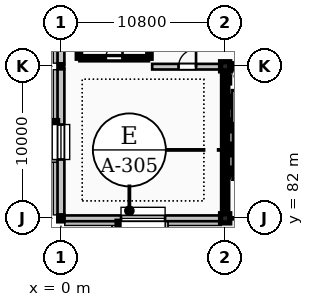
"""IFC4 building model, lengths in metres.
Left out: names, types, materials, properties, quantities, classifications, styles, units other than length and angle.
Written with IfcOpenShell. Run it as: python <this file> out.ifc"""

import sys

from ifc_helpers import new_model, si_unit, direction, frame, frame_2d, origin, origin_2d, place, context, subcontext, project, spatial, rectangle, hollow_rectangle, i_section, extrude, element, fill, save


model = new_model("IFC4")
c1 = context("Model", 3, precision=1e-05, world=origin(), true_north=direction((0.0, 1.0)))
c2 = subcontext(c1, "Body", "Model", "MODEL_VIEW")
j1 = project(units=[si_unit("LENGTHUNIT", "METRE"), si_unit("PLANEANGLEUNIT", "RADIAN")], contexts=[c1])
p1 = place(None, origin())
s1 = spatial("IfcSite", under=j1, at=p1, CompositionType="ELEMENT")
p2 = place(p1, origin())
s2 = spatial("IfcBuilding", under=s1, at=p2, CompositionType="ELEMENT")
p3 = place(p2, frame((0.0, 0.0, 24.0)))
s3 = spatial("IfcBuildingStorey", under=s2, at=p3, CompositionType="ELEMENT", Elevation=24.0)
p4 = place(p3, frame((0.0, 82.0, 0.0), z_axis=(0.0, 0.0, 1.0), x_axis=(1.0, 0.0, 0.0)))
e1 = element("IfcColumn", 1, at=p4, inside=s3, PredefinedType="COLUMN", context=c2, shape_type="SweptSolid", body=[
    extrude(i_section(OverallWidth=0.3, OverallDepth=0.34, WebThickness=0.012, FlangeThickness=0.021, FilletRadius=0.027, at=origin_2d()), origin(), (0.0, 0.0, 1.0), 4.8),
])
p5 = place(p3, frame((0.0, 92.0, 0.0), z_axis=(0.0, 0.0, 1.0), x_axis=(1.0, 0.0, 0.0)))
e2 = element("IfcColumn", 2, at=p5, inside=s3, PredefinedType="COLUMN", context=c2, shape_type="SweptSolid", body=[
    extrude(hollow_rectangle(XDim=0.22, YDim=0.22, WallThickness=0.012, InnerFilletRadius=0.012, OuterFilletRadius=0.025, at=origin_2d()), origin(), (0.0, 0.0, 1.0), 4.8),
])
for number, where, z_axis, x_axis in (
    (3, (10.8, 82.0, 0.0), (0.0, 0.0, 1.0), (1.0, 0.0, 0.0)),
    (4, (10.8, 92.0, 0.0), (0.0, 0.0, 1.0), (1.0, 0.0, 0.0)),
):
    element("IfcColumn", number, at=place(p3, frame(where, z_axis=z_axis, x_axis=x_axis)), inside=s3, PredefinedType="COLUMN", context=c2, shape_type="SweptSolid", body=[
        extrude(rectangle(XDim=0.6, YDim=0.6, at=origin_2d()), origin(), (0.0, 0.0, 1.0), 4.8),
    ])
p6 = place(p3, frame((0.0, 101.894, 0.0), z_axis=(0.0, 0.0, 1.0), x_axis=(0.0, -1.0, 0.0)))
e5 = element("IfcWall", 5, at=p6, inside=s3, PredefinedType="STANDARD", context=c2, shape_type="SweptSolid", body=[
    extrude(rectangle(XDim=9.788, YDim=0.45, at=frame_2d((4.894, 0.0))), origin(), (0.0, 0.0, 1.0), 4.56),
])
p7 = place(p6, frame((3.144, 0.0, 1.0)))
e6 = element("IfcOpeningElement", 6, at=p7, cuts=e5, PredefinedType="OPENING", context=c2, shape_type="SweptSolid", body=[
    extrude(rectangle(XDim=3.5, YDim=2.3, at=frame_2d((1.75, 1.15))), frame((0.0, 0.235, 0.0), z_axis=(0.0, -1.0, 0.0), x_axis=(1.0, 0.0, 0.0)), (0.0, 0.0, 1.0), 0.47),
])
p8 = place(p3, frame((0.0, 91.894, 0.0), z_axis=(0.0, 0.0, 1.0), x_axis=(0.0, -1.0, 0.0)))
e7 = element("IfcWall", 7, at=p8, inside=s3, PredefinedType="STANDARD", context=c2, shape_type="SweptSolid", body=[
    extrude(rectangle(XDim=9.749, YDim=0.45, at=frame_2d((4.875, 0.0))), origin(), (0.0, 0.0, 1.0), 4.56),
])
p9 = place(p8, frame((3.725, 0.0, 1.0)))
e8 = element("IfcOpeningElement", 8, at=p9, cuts=e7, PredefinedType="OPENING", context=c2, shape_type="SweptSolid", body=[
    extrude(rectangle(XDim=2.3, YDim=2.3, at=frame_2d((1.15, 1.15))), frame((0.0, 0.235, 0.0), z_axis=(0.0, -1.0, 0.0), x_axis=(1.0, 0.0, 0.0)), (0.0, 0.0, 1.0), 0.47),
])
p10 = place(p3, frame((0.145, 82.0, 0.0), z_axis=(0.0, 0.0, 1.0), x_axis=(1.0, 0.0, 0.0)))
e9 = element("IfcWall", 9, at=p10, inside=s3, PredefinedType="STANDARD", context=c2, shape_type="SweptSolid", body=[
    extrude(rectangle(XDim=10.51, YDim=0.38, at=frame_2d((5.255, 0.0))), origin(), (0.0, 0.0, 1.0), 4.17),
])
p11 = place(p10, frame((3.805, 0.0, 1.0)))
e10 = element("IfcOpeningElement", 10, at=p11, cuts=e9, PredefinedType="OPENING", context=c2, shape_type="SweptSolid", body=[
    extrude(rectangle(XDim=2.9, YDim=2.5, at=frame_2d((1.45, 1.25))), frame((0.0, 0.2, 0.0), z_axis=(0.0, -1.0, 0.0), x_axis=(1.0, 0.0, 0.0)), (0.0, 0.0, 1.0), 0.4),
])
p12 = place(p3, frame((10.945, 82.0, 0.0), z_axis=(0.0, 0.0, 1.0), x_axis=(1.0, 0.0, 0.0)))
e11 = element("IfcWall", 11, at=p12, inside=s3, PredefinedType="STANDARD", context=c2, shape_type="SweptSolid", body=[
    extrude(rectangle(XDim=0.225, YDim=0.3, at=frame_2d((0.112, 0.0))), origin(), (0.0, 0.0, 1.0), 4.56),
])
p13 = place(p3, frame((11.1, 92.0, 0.0), z_axis=(0.0, 0.0, 1.0), x_axis=(1.0, 0.0, 0.0)))
e12 = element("IfcWall", 12, at=p13, inside=s3, PredefinedType="SHEAR", context=c2, shape_type="SweptSolid", body=[
    extrude(rectangle(XDim=10.2, YDim=0.35, at=frame_2d((5.1, 0.0))), origin(), (0.0, 0.0, 1.0), 4.56),
])
p14 = place(p3, frame((10.8, 82.3, 0.0), z_axis=(0.0, 0.0, 1.0), x_axis=(0.0, 1.0, 0.0)))
e13 = element("IfcWall", 13, at=p14, inside=s3, PredefinedType="SHEAR", context=c2, shape_type="SweptSolid", body=[
    extrude(rectangle(XDim=9.4, YDim=0.35, at=frame_2d((4.7, 0.0))), origin(), (0.0, 0.0, 1.0), 4.56),
])
for number, where, z_axis, x_axis in (
    (14, (1.18, 92.53, 0.0), (0.0, 0.0, 1.0), (0.0, 1.0, 0.0)),
    (15, (5.82, 92.53, 0.0), (0.0, 0.0, 1.0), (0.0, 1.0, 0.0)),
):
    element("IfcWall", number, at=place(p3, frame(where, z_axis=z_axis, x_axis=x_axis)), inside=s3, PredefinedType="SHEAR", context=c2, shape_type="SweptSolid", body=[
        extrude(rectangle(XDim=9.14, YDim=0.22, at=frame_2d((4.57, 0.0))), origin(), (0.0, 0.0, 1.0), 4.56),
    ])
p15 = place(p3, frame((1.3, 92.53, 0.0), z_axis=(0.0, 0.0, 1.0), x_axis=(1.0, 0.0, 0.0)))
e16 = element("IfcWall", 16, at=p15, inside=s3, PredefinedType="SHEAR", context=c2, shape_type="SweptSolid", body=[
    extrude(rectangle(XDim=4.4, YDim=0.22, at=frame_2d((2.2, 0.0))), origin(), (0.0, 0.0, 1.0), 4.56),
])
p16 = place(p15, frame((1.65, 0.0, 0.0)))
e17 = element("IfcOpeningElement", 17, at=p16, cuts=e16, PredefinedType="OPENING", context=c2, shape_type="SweptSolid", body=[
    extrude(rectangle(XDim=1.1, YDim=2.2, at=frame_2d((0.55, 1.1))), frame((0.0, 0.12, 0.0), z_axis=(0.0, -1.0, 0.0), x_axis=(1.0, 0.0, 0.0)), (0.0, 0.0, 1.0), 0.24),
])
p17 = place(p3, frame((6.0, 91.975, 0.0), z_axis=(0.0, 0.0, 1.0), x_axis=(1.0, 0.0, 0.0)))
e18 = element("IfcWall", 18, at=p17, inside=s3, PredefinedType="PARTITIONING", context=c2, shape_type="SweptSolid", body=[
    extrude(rectangle(XDim=4.62, YDim=0.37, at=frame_2d((2.31, 0.0))), origin(), (0.0, 0.0, 1.0), 4.17),
])
p18 = place(p17, frame((1.735, 0.0, 0.0)))
e19 = element("IfcOpeningElement", 19, at=p18, cuts=e18, PredefinedType="OPENING", context=c2, shape_type="SweptSolid", body=[
    extrude(rectangle(XDim=1.15, YDim=2.25, at=frame_2d((0.575, 1.125))), frame((0.0, 0.195, 0.0), z_axis=(0.0, -1.0, 0.0), x_axis=(1.0, 0.0, 0.0)), (0.0, 0.0, 1.0), 0.39),
])
p19 = place(p9, origin())
e20 = element("IfcWindow", 20, at=p19, inside=s3, PartitioningType="SINGLE_PANEL", PredefinedType="WINDOW", context=c2, shape_type="SweptSolid", body=[
    extrude(rectangle(XDim=2.3, YDim=2.3, at=frame_2d((1.15, 1.15))), frame((0.0, 0.03, 0.0), z_axis=(0.0, -1.0, 0.0), x_axis=(1.0, 0.0, 0.0)), (0.0, 0.0, 1.0), 0.06),
])
fill(e8, e20)
p20 = place(p11, origin())
e21 = element("IfcWindow", 21, at=p20, inside=s3, PartitioningType="SINGLE_PANEL", PredefinedType="WINDOW", context=c2, shape_type="SweptSolid", body=[
    extrude(rectangle(XDim=2.9, YDim=2.5, at=frame_2d((1.45, 1.25))), frame((0.0, 0.03, 0.0), z_axis=(0.0, -1.0, 0.0), x_axis=(1.0, 0.0, 0.0)), (0.0, 0.0, 1.0), 0.06),
])
fill(e10, e21)
p21 = place(p16, origin())
e22 = element("IfcDoor", 22, at=p21, inside=s3, OperationType="SINGLE_SWING_RIGHT", PredefinedType="DOOR", context=c2, shape_type="SweptSolid", body=[
    extrude(rectangle(XDim=1.1, YDim=2.2, at=frame_2d((0.55, 1.1))), frame((0.0, 0.025, 0.0), z_axis=(0.0, -1.0, 0.0), x_axis=(1.0, 0.0, 0.0)), (0.0, 0.0, 1.0), 0.05),
])
fill(e17, e22)
p22 = place(p18, origin())
e23 = element("IfcDoor", 23, at=p22, inside=s3, OperationType="SINGLE_SWING_RIGHT", PredefinedType="DOOR", context=c2, shape_type="SweptSolid", body=[
    extrude(rectangle(XDim=1.15, YDim=2.25, at=frame_2d((0.575, 1.125))), frame((0.0, 0.025, 0.0), z_axis=(0.0, -1.0, 0.0), x_axis=(1.0, 0.0, 0.0)), (0.0, 0.0, 1.0), 0.05),
])
fill(e19, e23)
save(model, sys.argv[1])
